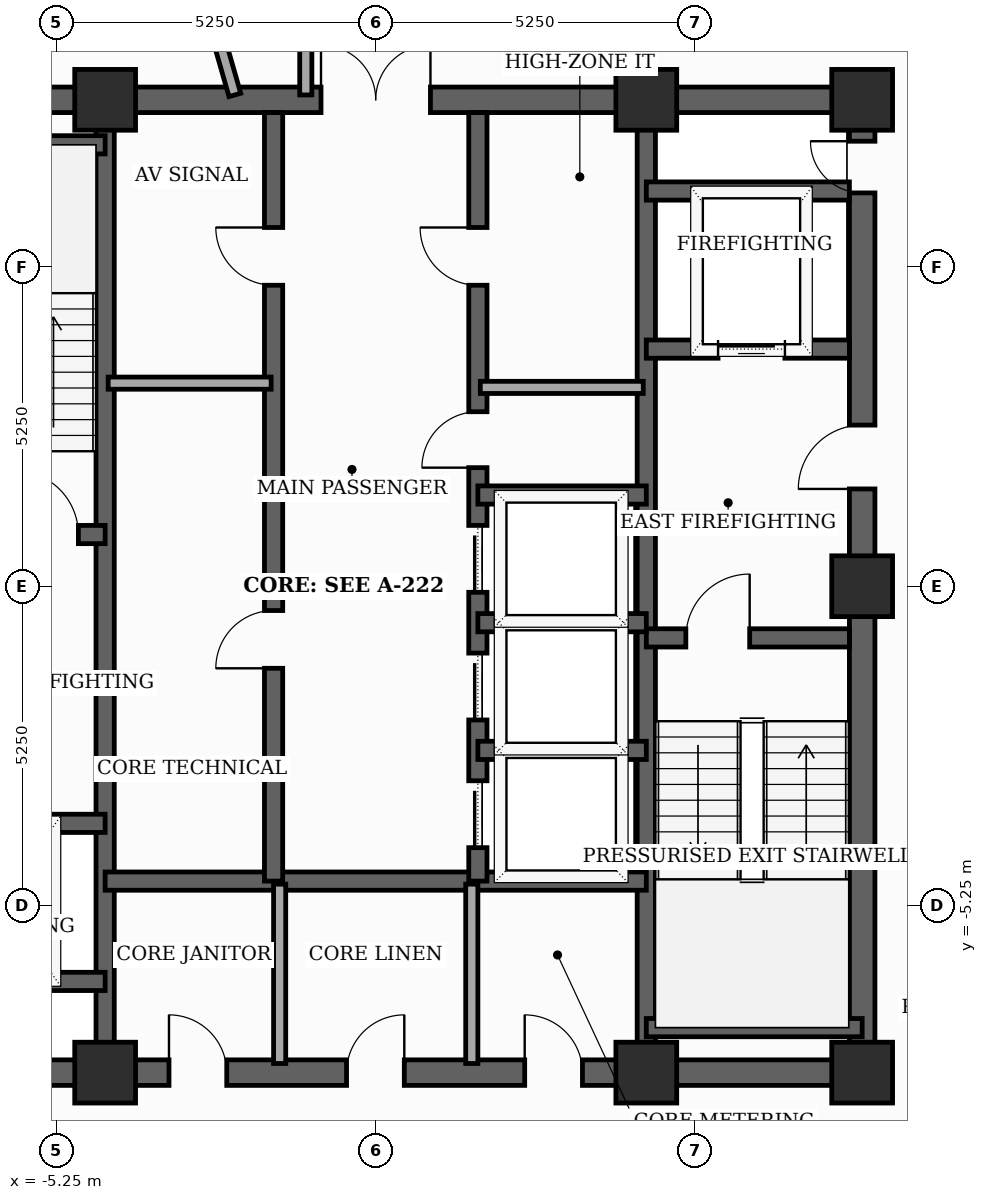
"""IFC4 building model, lengths in metres.
Left out: names, types, materials, properties, quantities, classifications, styles, units other than length and angle.
Written with IfcOpenShell. Run it as: python <this file> out.ifc"""

import sys

from ifc_helpers import new_model, si_unit, direction, frame, frame_2d, origin, origin_2d, place, context, subcontext, project, spatial, rectangle, extrude, element, fill, save


model = new_model("IFC4")
c1 = context("Model", 3, precision=1e-05, world=origin(), true_north=direction((0.0, 1.0)))
c2 = subcontext(c1, "Body", "Model", "MODEL_VIEW")
j1 = project(units=[si_unit("LENGTHUNIT", "METRE"), si_unit("PLANEANGLEUNIT", "RADIAN")], contexts=[c1])
p1 = place(None, origin())
s1 = spatial("IfcSite", under=j1, at=p1, CompositionType="ELEMENT")
p2 = place(p1, origin())
s2 = spatial("IfcBuilding", under=s1, at=p2, CompositionType="ELEMENT")
p3 = place(p2, frame((0.0, 0.0, 301.7)))
s3 = spatial("IfcBuildingStorey", under=s2, at=p3, CompositionType="ELEMENT", Elevation=301.7)
for number, where, z_axis, x_axis in (
    (1, (-4.45, -8.0, 0.0), (0.0, 0.0, 1.0), (1.0, 0.0, 0.0)),
    (2, (4.45, -8.0, 0.0), (0.0, 0.0, 1.0), (1.0, 0.0, 0.0)),
    (3, (8.0, -8.0, 0.0), (0.0, 0.0, 1.0), (1.0, 0.0, 0.0)),
    (4, (8.0, 0.0, 0.0), (0.0, 0.0, 1.0), (1.0, 0.0, 0.0)),
    (5, (8.0, 8.0, 0.0), (0.0, 0.0, 1.0), (1.0, 0.0, 0.0)),
    (6, (4.45, 8.0, 0.0), (0.0, 0.0, 1.0), (1.0, 0.0, 0.0)),
    (7, (-4.45, 8.0, 0.0), (0.0, 0.0, 1.0), (1.0, 0.0, 0.0)),
):
    element("IfcColumn", number, at=place(p3, frame(where, z_axis=z_axis, x_axis=x_axis)), inside=s3, PredefinedType="COLUMN", context=c2, shape_type="SweptSolid", body=[
        extrude(rectangle(XDim=1.0, YDim=1.0, at=origin_2d()), origin(), (0.0, 0.0, 1.0), 3.7),
    ])
p4 = place(p3, frame((8.0, -8.0, 0.0), z_axis=(0.0, 0.0, 1.0), x_axis=(0.0, 1.0, 0.0)))
e8 = element("IfcWall", 8, at=p4, inside=s3, PredefinedType="SHEAR", context=c2, shape_type="SweptSolid", body=[
    extrude(rectangle(XDim=16.0, YDim=0.42, at=frame_2d((8.0, 0.0))), origin(), (0.0, 0.0, 1.0), 3.5),
])
p5 = place(p4, frame((9.6, 0.0, 0.0)))
e9 = element("IfcOpeningElement", 9, at=p5, cuts=e8, PredefinedType="OPENING", context=c2, shape_type="SweptSolid", body=[
    extrude(rectangle(XDim=1.05, YDim=2.15, at=frame_2d((0.525, 1.075))), frame((0.0, 0.22, 0.0), z_axis=(0.0, -1.0, 0.0), x_axis=(1.0, 0.0, 0.0)), (0.0, 0.0, 1.0), 0.44),
])
p6 = place(p4, frame((14.469, 0.0, 0.0)))
e10 = element("IfcOpeningElement", 10, at=p6, cuts=e8, PredefinedType="OPENING", context=c2, shape_type="SweptSolid", body=[
    extrude(rectangle(XDim=0.85, YDim=2.02, at=frame_2d((0.425, 1.01))), frame((0.0, 0.22, 0.0), z_axis=(0.0, -1.0, 0.0), x_axis=(1.0, 0.0, 0.0)), (0.0, 0.0, 1.0), 0.44),
])
p7 = place(p3, frame((-8.0, -8.0, 0.0), z_axis=(0.0, 0.0, 1.0), x_axis=(1.0, 0.0, 0.0)))
e11 = element("IfcWall", 11, at=p7, inside=s3, PredefinedType="SHEAR", context=c2, shape_type="SweptSolid", body=[
    extrude(rectangle(XDim=16.0, YDim=0.42, at=frame_2d((8.0, 0.0))), origin(), (0.0, 0.0, 1.0), 3.5),
])
p8 = place(p7, frame((4.6, 0.0, 0.0)))
e12 = element("IfcOpeningElement", 12, at=p8, cuts=e11, PredefinedType="OPENING", context=c2, shape_type="SweptSolid", body=[
    extrude(rectangle(XDim=0.95, YDim=2.1, at=frame_2d((0.475, 1.05))), frame((0.0, 0.22, 0.0), z_axis=(0.0, -1.0, 0.0), x_axis=(1.0, 0.0, 0.0)), (0.0, 0.0, 1.0), 0.44),
])
p9 = place(p7, frame((7.52, 0.0, 0.0)))
e13 = element("IfcOpeningElement", 13, at=p9, cuts=e11, PredefinedType="OPENING", context=c2, shape_type="SweptSolid", body=[
    extrude(rectangle(XDim=0.95, YDim=2.1, at=frame_2d((0.475, 1.05))), frame((0.0, 0.22, 0.0), z_axis=(0.0, -1.0, 0.0), x_axis=(1.0, 0.0, 0.0)), (0.0, 0.0, 1.0), 0.44),
])
p10 = place(p7, frame((10.45, 0.0, 0.0)))
e14 = element("IfcOpeningElement", 14, at=p10, cuts=e11, PredefinedType="OPENING", context=c2, shape_type="SweptSolid", body=[
    extrude(rectangle(XDim=0.95, YDim=2.1, at=frame_2d((0.475, 1.05))), frame((0.0, 0.22, 0.0), z_axis=(0.0, -1.0, 0.0), x_axis=(1.0, 0.0, 0.0)), (0.0, 0.0, 1.0), 0.44),
])
p11 = place(p3, frame((-8.0, 8.0, 0.0), z_axis=(0.0, 0.0, 1.0), x_axis=(1.0, 0.0, 0.0)))
e15 = element("IfcWall", 15, at=p11, inside=s3, PredefinedType="SHEAR", context=c2, shape_type="SweptSolid", body=[
    extrude(rectangle(XDim=16.0, YDim=0.42, at=frame_2d((8.0, 0.0))), origin(), (0.0, 0.0, 1.0), 3.5),
])
p12 = place(p11, frame((7.1, 0.0, 0.0)))
e16 = element("IfcOpeningElement", 16, at=p12, cuts=e15, PredefinedType="OPENING", context=c2, shape_type="SweptSolid", body=[
    extrude(rectangle(XDim=1.8, YDim=2.15, at=frame_2d((0.9, 1.075))), frame((0.0, 0.22, 0.0), z_axis=(0.0, -1.0, 0.0), x_axis=(1.0, 0.0, 0.0)), (0.0, 0.0, 1.0), 0.44),
])
for number, where, z_axis, x_axis in (
    (17, (-4.45, -7.79, 0.0), (0.0, 0.0, 1.0), (0.0, 1.0, 0.0)),
    (18, (4.45, -7.79, 0.0), (0.0, 0.0, 1.0), (0.0, 1.0, 0.0)),
):
    element("IfcWall", number, at=place(p3, frame(where, z_axis=z_axis, x_axis=x_axis)), inside=s3, PredefinedType="SHEAR", context=c2, shape_type="SweptSolid", body=[
        extrude(rectangle(XDim=15.58, YDim=0.3, at=frame_2d((7.79, 0.0))), origin(), (0.0, 0.0, 1.0), 3.5),
    ])
p13 = place(p3, frame((-7.79, 0.85, 0.0), z_axis=(0.0, 0.0, 1.0), x_axis=(1.0, 0.0, 0.0)))
e19 = element("IfcWall", 19, at=p13, inside=s3, PredefinedType="SHEAR", context=c2, shape_type="SweptSolid", body=[
    extrude(rectangle(XDim=3.34, YDim=0.3, at=frame_2d((1.67, 0.0))), origin(), (0.0, 0.0, 1.0), 3.5),
])
p14 = place(p13, frame((1.85, 0.0, 0.0)))
e20 = element("IfcOpeningElement", 20, at=p14, cuts=e19, PredefinedType="OPENING", context=c2, shape_type="SweptSolid", body=[
    extrude(rectangle(XDim=1.05, YDim=2.15, at=frame_2d((0.525, 1.075))), frame((0.0, 0.16, 0.0), z_axis=(0.0, -1.0, 0.0), x_axis=(1.0, 0.0, 0.0)), (0.0, 0.0, 1.0), 0.32),
])
p15 = place(p3, frame((-7.79, 7.26, 0.0), z_axis=(0.0, 0.0, 1.0), x_axis=(1.0, 0.0, 0.0)))
e21 = element("IfcWall", 21, at=p15, inside=s3, PredefinedType="SHEAR", context=c2, shape_type="SweptSolid", body=[
    extrude(rectangle(XDim=3.34, YDim=0.3, at=frame_2d((1.67, 0.0))), origin(), (0.0, 0.0, 1.0), 3.5),
])
p16 = place(p3, frame((4.45, -0.85, 0.0), z_axis=(0.0, 0.0, 1.0), x_axis=(1.0, 0.0, 0.0)))
e22 = element("IfcWall", 22, at=p16, inside=s3, PredefinedType="SHEAR", context=c2, shape_type="SweptSolid", body=[
    extrude(rectangle(XDim=3.34, YDim=0.3, at=frame_2d((1.67, 0.0))), origin(), (0.0, 0.0, 1.0), 3.5),
])
p17 = place(p16, frame((0.65, 0.0, 0.0)))
e23 = element("IfcOpeningElement", 23, at=p17, cuts=e22, PredefinedType="OPENING", context=c2, shape_type="SweptSolid", body=[
    extrude(rectangle(XDim=1.05, YDim=2.15, at=frame_2d((0.525, 1.075))), frame((0.0, 0.16, 0.0), z_axis=(0.0, -1.0, 0.0), x_axis=(1.0, 0.0, 0.0)), (0.0, 0.0, 1.0), 0.32),
])
p18 = place(p3, frame((4.45, -7.26, 0.0), z_axis=(0.0, 0.0, 1.0), x_axis=(1.0, 0.0, 0.0)))
e24 = element("IfcWall", 24, at=p18, inside=s3, PredefinedType="SHEAR", context=c2, shape_type="SweptSolid", body=[
    extrude(rectangle(XDim=3.55, YDim=0.3, at=frame_2d((1.775, 0.0))), origin(), (0.0, 0.0, 1.0), 3.5),
])
p19 = place(p3, frame((-7.79, -3.9, 0.0), z_axis=(0.0, 0.0, 1.0), x_axis=(1.0, 0.0, 0.0)))
e25 = element("IfcWall", 25, at=p19, inside=s3, PredefinedType="SHEAR", context=c2, shape_type="SweptSolid", body=[
    extrude(rectangle(XDim=3.34, YDim=0.3, at=frame_2d((1.67, 0.0))), origin(), (0.0, 0.0, 1.0), 3.5),
])
p20 = place(p19, frame((1.27, 0.0, 0.0)))
e26 = element("IfcOpeningElement", 26, at=p20, cuts=e25, PredefinedType="OPENING", context=c2, shape_type="SweptSolid", body=[
    extrude(rectangle(XDim=1.1, YDim=2.1, at=frame_2d((0.55, 1.05))), frame((0.0, 0.16, 0.0), z_axis=(0.0, -1.0, 0.0), x_axis=(1.0, 0.0, 0.0)), (0.0, 0.0, 1.0), 0.32),
])
p21 = place(p3, frame((-7.79, -6.5, 0.0), z_axis=(0.0, 0.0, 1.0), x_axis=(1.0, 0.0, 0.0)))
e27 = element("IfcWall", 27, at=p21, inside=s3, PredefinedType="SHEAR", context=c2, shape_type="SweptSolid", body=[
    extrude(rectangle(XDim=3.34, YDim=0.3, at=frame_2d((1.67, 0.0))), origin(), (0.0, 0.0, 1.0), 3.5),
])
p22 = place(p3, frame((4.45, 3.9, 0.0), z_axis=(0.0, 0.0, 1.0), x_axis=(1.0, 0.0, 0.0)))
e28 = element("IfcWall", 28, at=p22, inside=s3, PredefinedType="SHEAR", context=c2, shape_type="SweptSolid", body=[
    extrude(rectangle(XDim=3.34, YDim=0.3, at=frame_2d((1.67, 0.0))), origin(), (0.0, 0.0, 1.0), 3.5),
])
p23 = place(p22, frame((1.18, 0.0, 0.0)))
e29 = element("IfcOpeningElement", 29, at=p23, cuts=e28, PredefinedType="OPENING", context=c2, shape_type="SweptSolid", body=[
    extrude(rectangle(XDim=1.1, YDim=2.1, at=frame_2d((0.55, 1.05))), frame((0.0, 0.16, 0.0), z_axis=(0.0, -1.0, 0.0), x_axis=(1.0, 0.0, 0.0)), (0.0, 0.0, 1.0), 0.32),
])
p24 = place(p3, frame((4.45, 6.5, 0.0), z_axis=(0.0, 0.0, 1.0), x_axis=(1.0, 0.0, 0.0)))
e30 = element("IfcWall", 30, at=p24, inside=s3, PredefinedType="SHEAR", context=c2, shape_type="SweptSolid", body=[
    extrude(rectangle(XDim=3.34, YDim=0.3, at=frame_2d((1.67, 0.0))), origin(), (0.0, 0.0, 1.0), 3.5),
])
p25 = place(p3, frame((-4.45, -4.85, 0.0), z_axis=(0.0, 0.0, 1.0), x_axis=(1.0, 0.0, 0.0)))
e31 = element("IfcWall", 31, at=p25, inside=s3, PredefinedType="SHEAR", context=c2, shape_type="SweptSolid", body=[
    extrude(rectangle(XDim=8.9, YDim=0.3, at=frame_2d((4.45, 0.0))), origin(), (0.0, 0.0, 1.0), 3.5),
])
p26 = place(p3, frame((-1.68, -4.85, 0.0), z_axis=(0.0, 0.0, 1.0), x_axis=(0.0, 1.0, 0.0)))
e32 = element("IfcWall", 32, at=p26, inside=s3, PredefinedType="SHEAR", context=c2, shape_type="SweptSolid", body=[
    extrude(rectangle(XDim=12.64, YDim=0.3, at=frame_2d((6.32, 0.0))), origin(), (0.0, 0.0, 1.0), 3.5),
])
p27 = place(p26, frame((3.5, 0.0, 0.0)))
e33 = element("IfcOpeningElement", 33, at=p27, cuts=e32, PredefinedType="OPENING", context=c2, shape_type="SweptSolid", body=[
    extrude(rectangle(XDim=0.95, YDim=2.1, at=frame_2d((0.475, 1.05))), frame((0.0, 0.16, 0.0), z_axis=(0.0, -1.0, 0.0), x_axis=(1.0, 0.0, 0.0)), (0.0, 0.0, 1.0), 0.32),
])
p28 = place(p26, frame((9.8, 0.0, 0.0)))
e34 = element("IfcOpeningElement", 34, at=p28, cuts=e32, PredefinedType="OPENING", context=c2, shape_type="SweptSolid", body=[
    extrude(rectangle(XDim=0.95, YDim=2.1, at=frame_2d((0.475, 1.05))), frame((0.0, 0.16, 0.0), z_axis=(0.0, -1.0, 0.0), x_axis=(1.0, 0.0, 0.0)), (0.0, 0.0, 1.0), 0.32),
])
p29 = place(p3, frame((1.68, -4.85, 0.0), z_axis=(0.0, 0.0, 1.0), x_axis=(0.0, 1.0, 0.0)))
e35 = element("IfcWall", 35, at=p29, inside=s3, PredefinedType="SHEAR", context=c2, shape_type="SweptSolid", body=[
    extrude(rectangle(XDim=12.64, YDim=0.3, at=frame_2d((6.32, 0.0))), origin(), (0.0, 0.0, 1.0), 3.5),
])
p30 = place(p29, frame((0.55, 0.0, 0.0)))
e36 = element("IfcOpeningElement", 36, at=p30, cuts=e35, PredefinedType="OPENING", context=c2, shape_type="SweptSolid", body=[
    extrude(rectangle(XDim=1.1, YDim=2.1, at=frame_2d((0.55, 1.05))), frame((0.0, 0.16, 0.0), z_axis=(0.0, -1.0, 0.0), x_axis=(1.0, 0.0, 0.0)), (0.0, 0.0, 1.0), 0.32),
])
p31 = place(p29, frame((2.65, 0.0, 0.0)))
e37 = element("IfcOpeningElement", 37, at=p31, cuts=e35, PredefinedType="OPENING", context=c2, shape_type="SweptSolid", body=[
    extrude(rectangle(XDim=1.1, YDim=2.1, at=frame_2d((0.55, 1.05))), frame((0.0, 0.16, 0.0), z_axis=(0.0, -1.0, 0.0), x_axis=(1.0, 0.0, 0.0)), (0.0, 0.0, 1.0), 0.32),
])
p32 = place(p29, frame((4.75, 0.0, 0.0)))
e38 = element("IfcOpeningElement", 38, at=p32, cuts=e35, PredefinedType="OPENING", context=c2, shape_type="SweptSolid", body=[
    extrude(rectangle(XDim=1.1, YDim=2.1, at=frame_2d((0.55, 1.05))), frame((0.0, 0.16, 0.0), z_axis=(0.0, -1.0, 0.0), x_axis=(1.0, 0.0, 0.0)), (0.0, 0.0, 1.0), 0.32),
])
p33 = place(p29, frame((6.8, 0.0, 0.0)))
e39 = element("IfcOpeningElement", 39, at=p33, cuts=e35, PredefinedType="OPENING", context=c2, shape_type="SweptSolid", body=[
    extrude(rectangle(XDim=0.92, YDim=2.1, at=frame_2d((0.46, 1.05))), frame((0.0, 0.16, 0.0), z_axis=(0.0, -1.0, 0.0), x_axis=(1.0, 0.0, 0.0)), (0.0, 0.0, 1.0), 0.32),
])
p34 = place(p29, frame((9.8, 0.0, 0.0)))
e40 = element("IfcOpeningElement", 40, at=p34, cuts=e35, PredefinedType="OPENING", context=c2, shape_type="SweptSolid", body=[
    extrude(rectangle(XDim=0.95, YDim=2.1, at=frame_2d((0.475, 1.05))), frame((0.0, 0.16, 0.0), z_axis=(0.0, -1.0, 0.0), x_axis=(1.0, 0.0, 0.0)), (0.0, 0.0, 1.0), 0.32),
])
for number, where, z_axis, x_axis in (
    (41, (1.68, 1.5, 0.0), (0.0, 0.0, 1.0), (1.0, 0.0, 0.0)),
    (42, (1.68, -2.7, 0.0), (0.0, 0.0, 1.0), (1.0, 0.0, 0.0)),
    (43, (1.68, -0.6, 0.0), (0.0, 0.0, 1.0), (1.0, 0.0, 0.0)),
):
    element("IfcWall", number, at=place(p3, frame(where, z_axis=z_axis, x_axis=x_axis)), inside=s3, PredefinedType="SHEAR", context=c2, shape_type="SweptSolid", body=[
        extrude(rectangle(XDim=2.77, YDim=0.3, at=frame_2d((1.385, 0.0))), origin(), (0.0, 0.0, 1.0), 3.5),
    ])
for number, where, z_axis, x_axis in (
    (44, (-1.58, -7.85, 0.0), (0.0, 0.0, 1.0), (0.0, 1.0, 0.0)),
    (45, (1.58, -7.85, 0.0), (0.0, 0.0, 1.0), (0.0, 1.0, 0.0)),
):
    element("IfcWall", number, at=place(p3, frame(where, z_axis=z_axis, x_axis=x_axis)), inside=s3, PredefinedType="SOLIDWALL", context=c2, shape_type="SweptSolid", body=[
        extrude(rectangle(XDim=2.95, YDim=0.2, at=frame_2d((1.475, 0.0))), origin(), (0.0, 0.0, 1.0), 2.885),
    ])
for number, where, z_axis, x_axis in (
    (46, (-4.4, 3.34, 0.0), (0.0, 0.0, 1.0), (1.0, 0.0, 0.0)),
    (47, (1.72, 3.27, 0.0), (0.0, 0.0, 1.0), (1.0, 0.0, 0.0)),
):
    element("IfcWall", number, at=place(p3, frame(where, z_axis=z_axis, x_axis=x_axis)), inside=s3, PredefinedType="SOLIDWALL", context=c2, shape_type="SweptSolid", body=[
        extrude(rectangle(XDim=2.68, YDim=0.2, at=frame_2d((1.34, 0.0))), origin(), (0.0, 0.0, 1.0), 3.5),
    ])
p35 = place(p3, frame((-1.15, 10.65, 0.0), z_axis=(0.0, 0.0, 1.0), x_axis=(0.0, -1.0, 0.0)))
e48 = element("IfcWall", 48, at=p35, inside=s3, PredefinedType="SOLIDWALL", context=c2, shape_type="SweptSolid", body=[
    extrude(rectangle(XDim=2.57, YDim=0.2, at=frame_2d((1.285, 0.0))), origin(), (0.0, 0.0, 1.0), 2.885),
])
p36 = place(p3, frame((-3.729, 13.005, 0.0), z_axis=(0.0, 0.0, 1.0), x_axis=(0.275658725111, -0.961255568135, 0.0)))
e49 = element("IfcWall", 49, at=p36, inside=s3, PredefinedType="SOLIDWALL", context=c2, shape_type="SweptSolid", body=[
    extrude(rectangle(XDim=5.124, YDim=0.2, at=frame_2d((2.562, 0.0))), origin(), (0.0, 0.0, 1.0), 2.885),
])
p37 = place(p5, origin())
e50 = element("IfcDoor", 50, at=p37, inside=s3, OperationType="SINGLE_SWING_LEFT", PredefinedType="DOOR", context=c2, shape_type="SweptSolid", body=[
    extrude(rectangle(XDim=1.05, YDim=2.15, at=frame_2d((0.525, 1.075))), frame((0.0, 0.025, 0.0), z_axis=(0.0, -1.0, 0.0), x_axis=(1.0, 0.0, 0.0)), (0.0, 0.0, 1.0), 0.05),
])
fill(e9, e50)
p38 = place(p6, origin())
e51 = element("IfcDoor", 51, at=p38, inside=s3, OperationType="SINGLE_SWING_RIGHT", PredefinedType="TRAPDOOR", context=c2, shape_type="SweptSolid", body=[
    extrude(rectangle(XDim=0.85, YDim=2.02, at=frame_2d((0.425, 1.01))), frame((0.0, 0.025, 0.0), z_axis=(0.0, -1.0, 0.0), x_axis=(1.0, 0.0, 0.0)), (0.0, 0.0, 1.0), 0.05),
])
fill(e10, e51)
p39 = place(p8, origin())
e52 = element("IfcDoor", 52, at=p39, inside=s3, OperationType="SINGLE_SWING_LEFT", PredefinedType="DOOR", context=c2, shape_type="SweptSolid", body=[
    extrude(rectangle(XDim=0.95, YDim=2.1, at=frame_2d((0.475, 1.05))), frame((0.0, 0.025, 0.0), z_axis=(0.0, -1.0, 0.0), x_axis=(1.0, 0.0, 0.0)), (0.0, 0.0, 1.0), 0.05),
])
fill(e12, e52)
p40 = place(p9, origin())
e53 = element("IfcDoor", 53, at=p40, inside=s3, OperationType="SINGLE_SWING_RIGHT", PredefinedType="DOOR", context=c2, shape_type="SweptSolid", body=[
    extrude(rectangle(XDim=0.95, YDim=2.1, at=frame_2d((0.475, 1.05))), frame((0.0, 0.025, 0.0), z_axis=(0.0, -1.0, 0.0), x_axis=(1.0, 0.0, 0.0)), (0.0, 0.0, 1.0), 0.05),
])
fill(e13, e53)
p41 = place(p10, origin())
e54 = element("IfcDoor", 54, at=p41, inside=s3, OperationType="SINGLE_SWING_LEFT", PredefinedType="DOOR", context=c2, shape_type="SweptSolid", body=[
    extrude(rectangle(XDim=0.95, YDim=2.1, at=frame_2d((0.475, 1.05))), frame((0.0, 0.025, 0.0), z_axis=(0.0, -1.0, 0.0), x_axis=(1.0, 0.0, 0.0)), (0.0, 0.0, 1.0), 0.05),
])
fill(e14, e54)
p42 = place(p12, origin())
e55 = element("IfcDoor", 55, at=p42, inside=s3, OperationType="DOUBLE_DOOR_SINGLE_SWING", PredefinedType="DOOR", context=c2, shape_type="SweptSolid", body=[
    extrude(rectangle(XDim=1.8, YDim=2.15, at=frame_2d((0.9, 1.075))), frame((0.0, 0.025, 0.0), z_axis=(0.0, -1.0, 0.0), x_axis=(1.0, 0.0, 0.0)), (0.0, 0.0, 1.0), 0.05),
])
fill(e16, e55)
p43 = place(p14, origin())
e56 = element("IfcDoor", 56, at=p43, inside=s3, OperationType="SINGLE_SWING_LEFT", PredefinedType="DOOR", context=c2, shape_type="SweptSolid", body=[
    extrude(rectangle(XDim=1.05, YDim=2.15, at=frame_2d((0.525, 1.075))), frame((0.0, 0.025, 0.0), z_axis=(0.0, -1.0, 0.0), x_axis=(1.0, 0.0, 0.0)), (0.0, 0.0, 1.0), 0.05),
])
fill(e20, e56)
p44 = place(p17, origin())
e57 = element("IfcDoor", 57, at=p44, inside=s3, OperationType="SINGLE_SWING_RIGHT", PredefinedType="DOOR", context=c2, shape_type="SweptSolid", body=[
    extrude(rectangle(XDim=1.05, YDim=2.15, at=frame_2d((0.525, 1.075))), frame((0.0, 0.025, 0.0), z_axis=(0.0, -1.0, 0.0), x_axis=(1.0, 0.0, 0.0)), (0.0, 0.0, 1.0), 0.05),
])
fill(e23, e57)
p45 = place(p23, origin())
e58 = element("IfcDoor", 58, at=p45, inside=s3, OperationType="SLIDING_TO_LEFT", PredefinedType="DOOR", context=c2, shape_type="SweptSolid", body=[
    extrude(rectangle(XDim=1.1, YDim=2.1, at=frame_2d((0.55, 1.05))), frame((0.0, 0.025, 0.0), z_axis=(0.0, -1.0, 0.0), x_axis=(1.0, 0.0, 0.0)), (0.0, 0.0, 1.0), 0.05),
])
fill(e29, e58)
p46 = place(p27, origin())
e59 = element("IfcDoor", 59, at=p46, inside=s3, OperationType="SINGLE_SWING_LEFT", PredefinedType="DOOR", context=c2, shape_type="SweptSolid", body=[
    extrude(rectangle(XDim=0.95, YDim=2.1, at=frame_2d((0.475, 1.05))), frame((0.0, 0.025, 0.0), z_axis=(0.0, -1.0, 0.0), x_axis=(1.0, 0.0, 0.0)), (0.0, 0.0, 1.0), 0.05),
])
fill(e33, e59)
p47 = place(p28, origin())
e60 = element("IfcDoor", 60, at=p47, inside=s3, OperationType="SINGLE_SWING_RIGHT", PredefinedType="DOOR", context=c2, shape_type="SweptSolid", body=[
    extrude(rectangle(XDim=0.95, YDim=2.1, at=frame_2d((0.475, 1.05))), frame((0.0, 0.025, 0.0), z_axis=(0.0, -1.0, 0.0), x_axis=(1.0, 0.0, 0.0)), (0.0, 0.0, 1.0), 0.05),
])
fill(e34, e60)
p48 = place(p30, origin())
e61 = element("IfcDoor", 61, at=p48, inside=s3, OperationType="SLIDING_TO_LEFT", PredefinedType="DOOR", context=c2, shape_type="SweptSolid", body=[
    extrude(rectangle(XDim=1.1, YDim=2.1, at=frame_2d((0.55, 1.05))), frame((0.0, 0.025, 0.0), z_axis=(0.0, -1.0, 0.0), x_axis=(1.0, 0.0, 0.0)), (0.0, 0.0, 1.0), 0.05),
])
fill(e36, e61)
p49 = place(p31, origin())
e62 = element("IfcDoor", 62, at=p49, inside=s3, OperationType="SLIDING_TO_LEFT", PredefinedType="DOOR", context=c2, shape_type="SweptSolid", body=[
    extrude(rectangle(XDim=1.1, YDim=2.1, at=frame_2d((0.55, 1.05))), frame((0.0, 0.025, 0.0), z_axis=(0.0, -1.0, 0.0), x_axis=(1.0, 0.0, 0.0)), (0.0, 0.0, 1.0), 0.05),
])
fill(e37, e62)
p50 = place(p32, origin())
e63 = element("IfcDoor", 63, at=p50, inside=s3, OperationType="SLIDING_TO_LEFT", PredefinedType="DOOR", context=c2, shape_type="SweptSolid", body=[
    extrude(rectangle(XDim=1.1, YDim=2.1, at=frame_2d((0.55, 1.05))), frame((0.0, 0.025, 0.0), z_axis=(0.0, -1.0, 0.0), x_axis=(1.0, 0.0, 0.0)), (0.0, 0.0, 1.0), 0.05),
])
fill(e38, e63)
p51 = place(p33, origin())
e64 = element("IfcDoor", 64, at=p51, inside=s3, OperationType="SINGLE_SWING_LEFT", PredefinedType="DOOR", context=c2, shape_type="SweptSolid", body=[
    extrude(rectangle(XDim=0.92, YDim=2.1, at=frame_2d((0.46, 1.05))), frame((0.0, 0.025, 0.0), z_axis=(0.0, -1.0, 0.0), x_axis=(1.0, 0.0, 0.0)), (0.0, 0.0, 1.0), 0.05),
])
fill(e39, e64)
p52 = place(p34, origin())
e65 = element("IfcDoor", 65, at=p52, inside=s3, OperationType="SINGLE_SWING_RIGHT", PredefinedType="DOOR", context=c2, shape_type="SweptSolid", body=[
    extrude(rectangle(XDim=0.95, YDim=2.1, at=frame_2d((0.475, 1.05))), frame((0.0, 0.025, 0.0), z_axis=(0.0, -1.0, 0.0), x_axis=(1.0, 0.0, 0.0)), (0.0, 0.0, 1.0), 0.05),
])
fill(e40, e65)
save(model, sys.argv[1])
